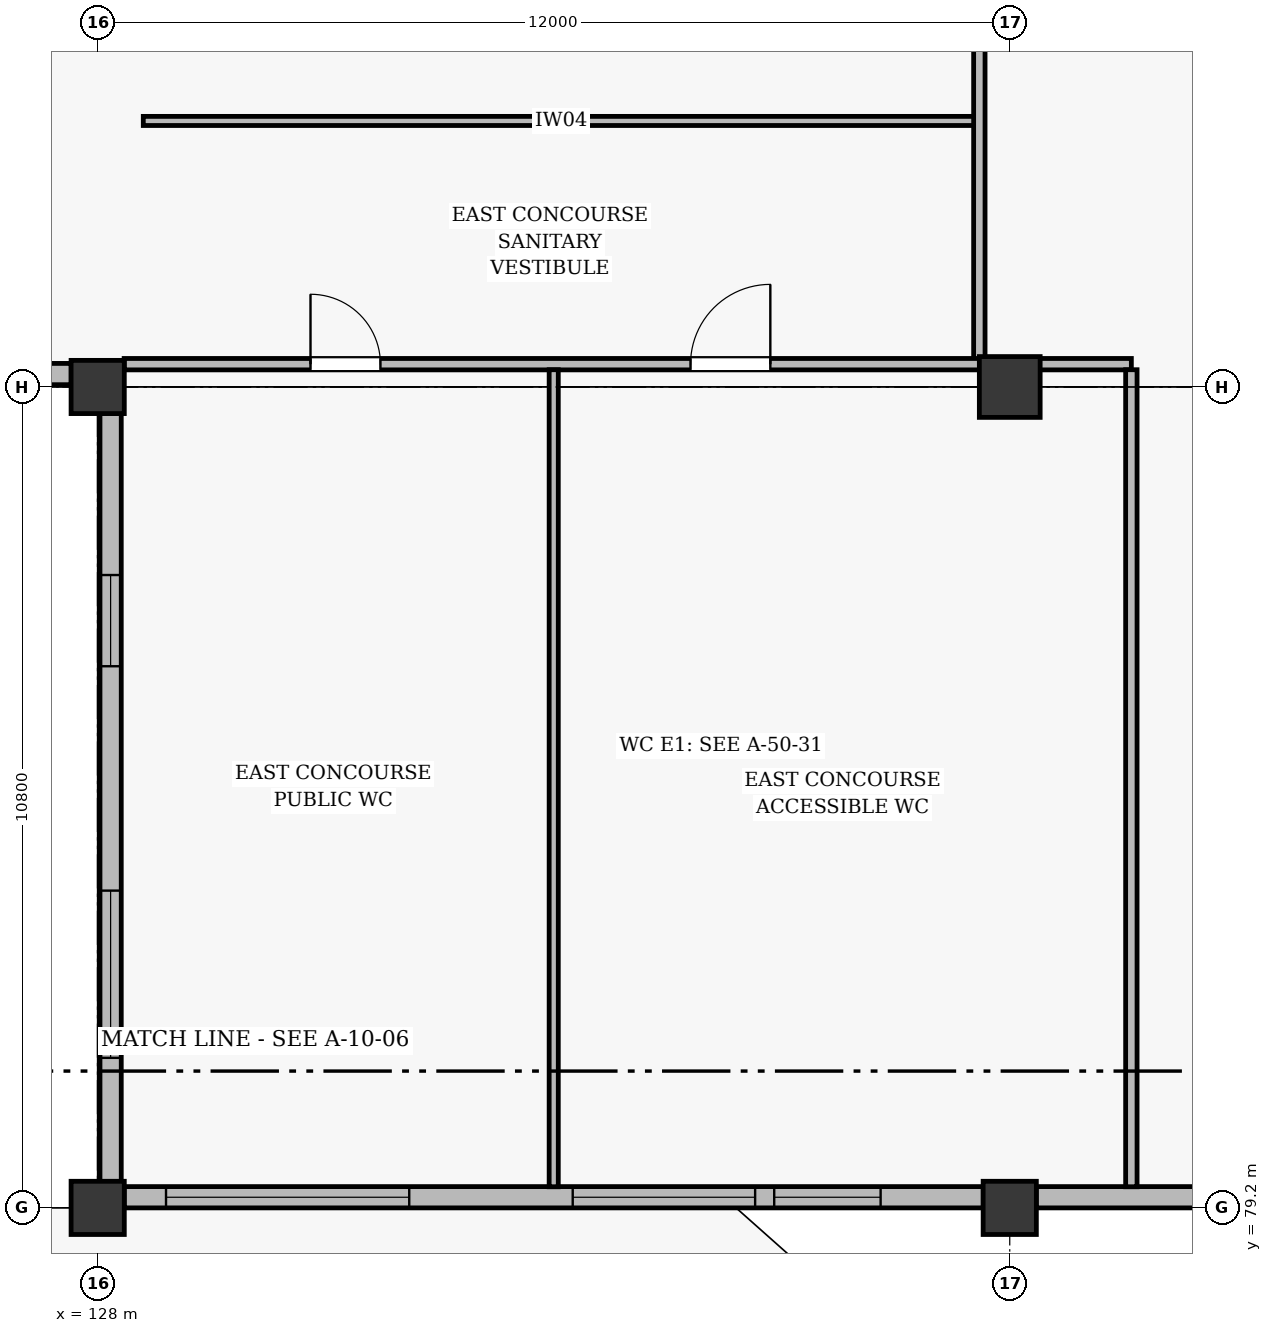
"""IFC4 building model, lengths in metres.
Left out: names, types, materials, properties, quantities, classifications, styles, units other than length and angle.
Written with IfcOpenShell. Run it as: python <this file> out.ifc"""

import sys

from ifc_helpers import new_model, si_unit, direction, frame, frame_2d, origin, origin_2d, place, context, subcontext, project, spatial, rectangle, extrude, element, fill, save


model = new_model("IFC4")
c1 = context("Model", 3, precision=1e-05, world=origin(), true_north=direction((0.0, 1.0)))
c2 = subcontext(c1, "Body", "Model", "MODEL_VIEW")
j1 = project(units=[si_unit("LENGTHUNIT", "METRE"), si_unit("PLANEANGLEUNIT", "RADIAN")], contexts=[c1])
p1 = place(None, origin())
s1 = spatial("IfcSite", under=j1, at=p1, CompositionType="ELEMENT")
p2 = place(p1, origin())
s2 = spatial("IfcBuilding", under=s1, at=p2, CompositionType="ELEMENT")
p3 = place(p2, origin())
s3 = spatial("IfcBuildingStorey", under=s2, at=p3, CompositionType="ELEMENT", Elevation=0.0)
for number, where, z_axis, x_axis in (
    (1, (128.0, 79.2, 0.0), (0.0, 0.0, 1.0), (1.0, 0.0, 0.0)),
    (2, (128.0, 90.0, 0.0), (0.0, 0.0, 1.0), (1.0, 0.0, 0.0)),
    (3, (140.0, 79.2, 0.0), (0.0, 0.0, 1.0), (1.0, 0.0, 0.0)),
):
    element("IfcColumn", number, at=place(p3, frame(where, z_axis=z_axis, x_axis=x_axis)), inside=s3, PredefinedType="COLUMN", context=c2, shape_type="SweptSolid", body=[
        extrude(rectangle(XDim=0.7, YDim=0.7, at=origin_2d()), origin(), (0.0, 0.0, 1.0), 6.6),
    ])
p4 = place(p3, frame((140.0, 90.0, 0.0), z_axis=(0.0, 0.0, 1.0), x_axis=(1.0, 0.0, 0.0)))
e4 = element("IfcColumn", 4, at=p4, inside=s3, PredefinedType="COLUMN", context=c2, shape_type="SweptSolid", body=[
    extrude(rectangle(XDim=0.8, YDim=0.8, at=origin_2d()), origin(), (0.0, 0.0, 1.0), 6.6),
])
p5 = place(p3, frame((128.348, 79.34, 0.0), z_axis=(0.0, 0.0, 1.0), x_axis=(1.0, 0.0, 0.0)))
e5 = element("IfcWall", 5, at=p5, inside=s3, PredefinedType="STANDARD", context=c2, shape_type="SweptSolid", body=[
    extrude(rectangle(XDim=11.304, YDim=0.28, at=frame_2d((5.652, 0.0))), origin(), (0.0, 0.0, 1.0), 5.69),
])
p6 = place(p5, frame((0.551, 0.0, 0.75)))
e6 = element("IfcOpeningElement", 6, at=p6, cuts=e5, PredefinedType="OPENING", context=c2, shape_type="SweptSolid", body=[
    extrude(rectangle(XDim=3.2, YDim=2.8, at=frame_2d((1.6, 1.4))), frame((0.0, 0.152, 0.0), z_axis=(0.0, -1.0, 0.0), x_axis=(1.0, 0.0, 0.0)), (0.0, 0.0, 1.0), 0.304),
])
p7 = place(p5, frame((5.902, 0.0, 0.75)))
e7 = element("IfcOpeningElement", 7, at=p7, cuts=e5, PredefinedType="OPENING", context=c2, shape_type="SweptSolid", body=[
    extrude(rectangle(XDim=2.4, YDim=2.4, at=frame_2d((1.2, 1.2))), frame((0.0, 0.152, 0.0), z_axis=(0.0, -1.0, 0.0), x_axis=(1.0, 0.0, 0.0)), (0.0, 0.0, 1.0), 0.304),
])
p8 = place(p5, frame((8.553, 0.0, 1.05)))
e8 = element("IfcOpeningElement", 8, at=p8, cuts=e5, PredefinedType="OPENING", context=c2, shape_type="SweptSolid", body=[
    extrude(rectangle(XDim=1.4, YDim=1.8, at=frame_2d((0.7, 0.9))), frame((0.0, 0.152, 0.0), z_axis=(0.0, -1.0, 0.0), x_axis=(1.0, 0.0, 0.0)), (0.0, 0.0, 1.0), 0.304),
])
p9 = place(p3, frame((140.348, 79.34, 0.0), z_axis=(0.0, 0.0, 1.0), x_axis=(1.0, 0.0, 0.0)))
e9 = element("IfcWall", 9, at=p9, inside=s3, PredefinedType="STANDARD", context=c2, shape_type="SweptSolid", body=[
    extrude(rectangle(XDim=12.304, YDim=0.28, at=frame_2d((6.152, 0.0))), origin(), (0.0, 0.0, 1.0), 5.69),
])
p10 = place(p9, frame((4.2, 0.0, 0.005)))
e10 = element("IfcOpeningElement", 10, at=p10, cuts=e9, PredefinedType="OPENING", context=c2, shape_type="SweptSolid", body=[
    extrude(rectangle(XDim=2.6, YDim=2.6, at=frame_2d((1.3, 1.3))), frame((0.0, 0.152, 0.0), z_axis=(0.0, -1.0, 0.0), x_axis=(1.0, 0.0, 0.0)), (0.0, 0.0, 1.0), 0.304),
])
p11 = place(p9, frame((9.287, 0.0, 1.05)))
e11 = element("IfcOpeningElement", 11, at=p11, cuts=e9, PredefinedType="OPENING", context=c2, shape_type="SweptSolid", body=[
    extrude(rectangle(XDim=1.4, YDim=1.8, at=frame_2d((0.7, 0.9))), frame((0.0, 0.152, 0.0), z_axis=(0.0, -1.0, 0.0), x_axis=(1.0, 0.0, 0.0)), (0.0, 0.0, 1.0), 0.304),
])
p12 = place(p3, frame((118.348, 90.17, 0.0), z_axis=(0.0, 0.0, 1.0), x_axis=(1.0, 0.0, 0.0)))
e12 = element("IfcWall", 12, at=p12, inside=s3, PredefinedType="STANDARD", context=c2, shape_type="SweptSolid", body=[
    extrude(rectangle(XDim=9.304, YDim=0.28, at=frame_2d((4.652, 0.0))), origin(), (0.0, 0.0, 1.0), 5.75),
])
p13 = place(p12, frame((0.926, 0.0, 0.75)))
e13 = element("IfcOpeningElement", 13, at=p13, cuts=e12, PredefinedType="OPENING", context=c2, shape_type="SweptSolid", body=[
    extrude(rectangle(XDim=3.2, YDim=2.8, at=frame_2d((1.6, 1.4))), frame((0.0, 0.152, 0.0), z_axis=(0.0, -1.0, 0.0), x_axis=(1.0, 0.0, 0.0)), (0.0, 0.0, 1.0), 0.304),
])
p14 = place(p12, frame((5.578, 0.0, 0.75)))
e14 = element("IfcOpeningElement", 14, at=p14, cuts=e12, PredefinedType="OPENING", context=c2, shape_type="SweptSolid", body=[
    extrude(rectangle(XDim=2.4, YDim=2.4, at=frame_2d((1.2, 1.2))), frame((0.0, 0.152, 0.0), z_axis=(0.0, -1.0, 0.0), x_axis=(1.0, 0.0, 0.0)), (0.0, 0.0, 1.0), 0.304),
])
p15 = place(p3, frame((128.17, 79.548, 0.0), z_axis=(0.0, 0.0, 1.0), x_axis=(0.0, 1.0, 0.0)))
e15 = element("IfcWall", 15, at=p15, inside=s3, PredefinedType="STANDARD", context=c2, shape_type="SweptSolid", body=[
    extrude(rectangle(XDim=10.104, YDim=0.28, at=frame_2d((5.052, 0.0))), origin(), (0.0, 0.0, 1.0), 5.69),
])
p16 = place(p15, frame((1.626, 0.0, 0.75)))
e16 = element("IfcOpeningElement", 16, at=p16, cuts=e15, PredefinedType="OPENING", context=c2, shape_type="SweptSolid", body=[
    extrude(rectangle(XDim=2.2, YDim=2.2, at=frame_2d((1.1, 1.1))), frame((0.0, 0.152, 0.0), z_axis=(0.0, -1.0, 0.0), x_axis=(1.0, 0.0, 0.0)), (0.0, 0.0, 1.0), 0.304),
])
p17 = place(p15, frame((6.778, 0.0, 1.05)))
e17 = element("IfcOpeningElement", 17, at=p17, cuts=e15, PredefinedType="OPENING", context=c2, shape_type="SweptSolid", body=[
    extrude(rectangle(XDim=1.2, YDim=0.9, at=frame_2d((0.6, 0.45))), frame((0.0, 0.152, 0.0), z_axis=(0.0, -1.0, 0.0), x_axis=(1.0, 0.0, 0.0)), (0.0, 0.0, 1.0), 0.304),
])
p18 = place(p3, frame((128.6, 93.5, 0.0), z_axis=(0.0, 0.0, 1.0), x_axis=(1.0, 0.0, 0.0)))
e18 = element("IfcWall", 18, at=p18, inside=s3, PredefinedType="PARTITIONING", context=c2, shape_type="SweptSolid", body=[
    extrude(rectangle(XDim=11.0, YDim=0.12, at=frame_2d((5.5, 0.0))), origin(), (0.0, 0.0, 1.0), 5.89),
])
p19 = place(p3, frame((139.6, 90.3, 0.0), z_axis=(0.0, 0.0, 1.0), x_axis=(0.0, 1.0, 0.0)))
e19 = element("IfcWall", 19, at=p19, inside=s3, PredefinedType="PARTITIONING", context=c2, shape_type="SweptSolid", body=[
    extrude(rectangle(XDim=14.6, YDim=0.15, at=frame_2d((7.3, 0.0))), origin(), (0.0, 0.0, 1.0), 5.74),
])
p20 = place(p19, frame((5.5, 0.0, 0.005)))
e20 = element("IfcOpeningElement", 20, at=p20, cuts=e19, PredefinedType="OPENING", context=c2, shape_type="SweptSolid", body=[
    extrude(rectangle(XDim=1.1, YDim=2.1, at=frame_2d((0.55, 1.05))), frame((0.0, 0.087, 0.0), z_axis=(0.0, -1.0, 0.0), x_axis=(1.0, 0.0, 0.0)), (0.0, 0.0, 1.0), 0.174),
])
p21 = place(p3, frame((128.348, 90.3, 0.0), z_axis=(0.0, 0.0, 1.0), x_axis=(1.0, 0.0, 0.0)))
e21 = element("IfcWall", 21, at=p21, inside=s3, PredefinedType="PARTITIONING", context=c2, shape_type="SweptSolid", body=[
    extrude(rectangle(XDim=13.252, YDim=0.15, at=frame_2d((6.626, 0.0))), origin(), (0.0, 0.0, 1.0), 5.74),
])
p22 = place(p21, frame((2.452, 0.0, 0.005)))
e22 = element("IfcOpeningElement", 22, at=p22, cuts=e21, PredefinedType="OPENING", context=c2, shape_type="SweptSolid", body=[
    extrude(rectangle(XDim=0.92, YDim=2.12, at=frame_2d((0.46, 1.06))), frame((0.0, 0.087, 0.0), z_axis=(0.0, -1.0, 0.0), x_axis=(1.0, 0.0, 0.0)), (0.0, 0.0, 1.0), 0.174),
])
p23 = place(p21, frame((7.452, 0.0, 0.005)))
e23 = element("IfcOpeningElement", 23, at=p23, cuts=e21, PredefinedType="OPENING", context=c2, shape_type="SweptSolid", body=[
    extrude(rectangle(XDim=1.05, YDim=2.15, at=frame_2d((0.525, 1.075))), frame((0.0, 0.087, 0.0), z_axis=(0.0, -1.0, 0.0), x_axis=(1.0, 0.0, 0.0)), (0.0, 0.0, 1.0), 0.174),
])
p24 = place(p3, frame((134.0, 79.478, 0.0), z_axis=(0.0, 0.0, 1.0), x_axis=(0.0, 1.0, 0.0)))
e24 = element("IfcWall", 24, at=p24, inside=s3, PredefinedType="PARTITIONING", context=c2, shape_type="SweptSolid", body=[
    extrude(rectangle(XDim=10.749, YDim=0.12, at=frame_2d((5.375, 0.0))), origin(), (0.0, 0.0, 1.0), 5.84),
])
p25 = place(p3, frame((141.6, 79.478, 0.0), z_axis=(0.0, 0.0, 1.0), x_axis=(0.0, 1.0, 0.0)))
e25 = element("IfcWall", 25, at=p25, inside=s3, PredefinedType="PARTITIONING", context=c2, shape_type="SweptSolid", body=[
    extrude(rectangle(XDim=10.749, YDim=0.15, at=frame_2d((5.375, 0.0))), origin(), (0.0, 0.0, 1.0), 5.74),
])
p26 = place(p6, origin())
e26 = element("IfcWindow", 26, at=p26, inside=s3, PartitioningType="DOUBLE_PANEL_VERTICAL", PredefinedType="WINDOW", context=c2, shape_type="SweptSolid", body=[
    extrude(rectangle(XDim=3.2, YDim=2.8, at=frame_2d((1.6, 1.4))), frame((0.0, 0.03, 0.0), z_axis=(0.0, -1.0, 0.0), x_axis=(1.0, 0.0, 0.0)), (0.0, 0.0, 1.0), 0.06),
])
fill(e6, e26)
p27 = place(p7, origin())
e27 = element("IfcWindow", 27, at=p27, inside=s3, PartitioningType="DOUBLE_PANEL_VERTICAL", PredefinedType="WINDOW", context=c2, shape_type="SweptSolid", body=[
    extrude(rectangle(XDim=2.4, YDim=2.4, at=frame_2d((1.2, 1.2))), frame((0.0, 0.03, 0.0), z_axis=(0.0, -1.0, 0.0), x_axis=(1.0, 0.0, 0.0)), (0.0, 0.0, 1.0), 0.06),
])
fill(e7, e27)
p28 = place(p8, origin())
e28 = element("IfcWindow", 28, at=p28, inside=s3, PartitioningType="DOUBLE_PANEL_VERTICAL", PredefinedType="WINDOW", context=c2, shape_type="SweptSolid", body=[
    extrude(rectangle(XDim=1.4, YDim=1.8, at=frame_2d((0.7, 0.9))), frame((0.0, 0.03, 0.0), z_axis=(0.0, -1.0, 0.0), x_axis=(1.0, 0.0, 0.0)), (0.0, 0.0, 1.0), 0.06),
])
fill(e8, e28)
p29 = place(p16, origin())
e29 = element("IfcWindow", 29, at=p29, inside=s3, PartitioningType="DOUBLE_PANEL_VERTICAL", PredefinedType="WINDOW", context=c2, shape_type="SweptSolid", body=[
    extrude(rectangle(XDim=2.2, YDim=2.2, at=frame_2d((1.1, 1.1))), frame((0.0, 0.03, 0.0), z_axis=(0.0, -1.0, 0.0), x_axis=(1.0, 0.0, 0.0)), (0.0, 0.0, 1.0), 0.06),
])
fill(e16, e29)
p30 = place(p17, origin())
e30 = element("IfcWindow", 30, at=p30, inside=s3, PartitioningType="DOUBLE_PANEL_VERTICAL", PredefinedType="WINDOW", context=c2, shape_type="SweptSolid", body=[
    extrude(rectangle(XDim=1.2, YDim=0.9, at=frame_2d((0.6, 0.45))), frame((0.0, 0.03, 0.0), z_axis=(0.0, -1.0, 0.0), x_axis=(1.0, 0.0, 0.0)), (0.0, 0.0, 1.0), 0.06),
])
fill(e17, e30)
p31 = place(p22, origin())
e31 = element("IfcDoor", 31, at=p31, inside=s3, OperationType="SINGLE_SWING_LEFT", PredefinedType="DOOR", context=c2, shape_type="SweptSolid", body=[
    extrude(rectangle(XDim=0.92, YDim=2.12, at=frame_2d((0.46, 1.06))), frame((0.0, 0.025, 0.0), z_axis=(0.0, -1.0, 0.0), x_axis=(1.0, 0.0, 0.0)), (0.0, 0.0, 1.0), 0.05),
])
fill(e22, e31)
p32 = place(p23, origin())
e32 = element("IfcDoor", 32, at=p32, inside=s3, OperationType="SINGLE_SWING_RIGHT", PredefinedType="DOOR", context=c2, shape_type="SweptSolid", body=[
    extrude(rectangle(XDim=1.05, YDim=2.15, at=frame_2d((0.525, 1.075))), frame((0.0, 0.025, 0.0), z_axis=(0.0, -1.0, 0.0), x_axis=(1.0, 0.0, 0.0)), (0.0, 0.0, 1.0), 0.05),
])
fill(e23, e32)
save(model, sys.argv[1])
